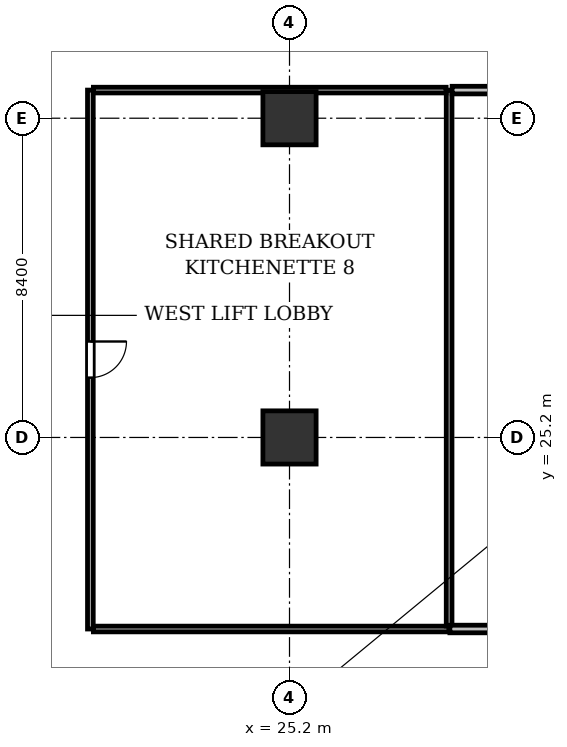
"""IFC4 building model, lengths in metres.
Left out: names, types, materials, properties, quantities, classifications, styles, units other than length and angle.
Written with IfcOpenShell. Run it as: python <this file> out.ifc"""

import sys

from ifc_helpers import new_model, si_unit, direction, frame, frame_2d, origin, origin_2d, place, context, subcontext, project, spatial, rectangle, extrude, element, fill, save


model = new_model("IFC4")
c1 = context("Model", 3, precision=1e-05, world=origin(), true_north=direction((0.0, 1.0)))
c2 = subcontext(c1, "Body", "Model", "MODEL_VIEW")
j1 = project(units=[si_unit("LENGTHUNIT", "METRE"), si_unit("PLANEANGLEUNIT", "RADIAN")], contexts=[c1])
p1 = place(None, origin())
s1 = spatial("IfcSite", under=j1, at=p1, CompositionType="ELEMENT")
p2 = place(p1, origin())
s2 = spatial("IfcBuilding", under=s1, at=p2, CompositionType="ELEMENT")
p3 = place(p2, frame((0.0, 0.0, 15.0)))
s3 = spatial("IfcBuildingStorey", under=s2, at=p3, CompositionType="ELEMENT", Elevation=15.0)
for number, where, z_axis, x_axis in (
    (1, (25.2, 25.2, 0.0), (0.0, 0.0, 1.0), (1.0, 0.0, 0.0)),
    (2, (25.2, 33.6, 0.0), (0.0, 0.0, 1.0), (1.0, 0.0, 0.0)),
):
    element("IfcColumn", number, at=place(p3, frame(where, z_axis=z_axis, x_axis=x_axis)), inside=s3, PredefinedType="COLUMN", context=c2, shape_type="SweptSolid", body=[
        extrude(rectangle(XDim=1.4, YDim=1.4, at=origin_2d()), origin(), (0.0, 0.0, 1.0), 4.8),
    ])
p4 = place(p3, frame((19.96, 34.34, 0.0), z_axis=(0.0, 0.0, 1.0), x_axis=(0.0, -1.0, 0.0)))
e3 = element("IfcWall", 3, at=p4, inside=s3, PredefinedType="PARTITIONING", context=c2, shape_type="SweptSolid", body=[
    extrude(rectangle(XDim=14.18, YDim=0.15, at=frame_2d((7.09, 0.0))), origin(), (0.0, 0.0, 1.0), 3.05),
])
p5 = place(p4, frame((6.615, 0.0, 0.0)))
e4 = element("IfcOpeningElement", 4, at=p5, cuts=e3, PredefinedType="OPENING", context=c2, shape_type="SweptSolid", body=[
    extrude(rectangle(XDim=0.95, YDim=2.15, at=frame_2d((0.475, 1.075))), frame((0.0, 0.085, 0.0), z_axis=(0.0, -1.0, 0.0), x_axis=(1.0, 0.0, 0.0)), (0.0, 0.0, 1.0), 0.17),
])
p6 = place(p3, frame((20.039, 20.16, 0.0), z_axis=(0.0, 0.0, 1.0), x_axis=(1.0, 0.0, 0.0)))
e5 = element("IfcWall", 5, at=p6, inside=s3, PredefinedType="PARTITIONING", context=c2, shape_type="SweptSolid", body=[
    extrude(rectangle(XDim=9.361, YDim=0.15, at=frame_2d((4.68, 0.0))), origin(), (0.0, 0.0, 1.0), 3.25),
])
p7 = place(p3, frame((29.4, 20.239, 0.0), z_axis=(0.0, 0.0, 1.0), x_axis=(0.0, 1.0, 0.0)))
e6 = element("IfcWall", 6, at=p7, inside=s3, PredefinedType="PARTITIONING", context=c2, shape_type="SweptSolid", body=[
    extrude(rectangle(XDim=14.101, YDim=0.15, at=frame_2d((7.051, 0.0))), origin(), (0.0, 0.0, 1.0), 3.05),
])
p8 = place(p3, frame((29.321, 34.34, 0.0), z_axis=(0.0, 0.0, 1.0), x_axis=(-1.0, 0.0, 0.0)))
e7 = element("IfcWall", 7, at=p8, inside=s3, PredefinedType="PARTITIONING", context=c2, shape_type="SweptSolid", body=[
    extrude(rectangle(XDim=9.282, YDim=0.15, at=frame_2d((4.641, 0.0))), origin(), (0.0, 0.0, 1.0), 3.25),
])
p9 = place(p3, frame((52.8, 34.34, 0.0), z_axis=(0.0, 0.0, 1.0), x_axis=(-1.0, 0.0, 0.0)))
e8 = element("IfcWall", 8, at=p9, inside=s3, PredefinedType="PARTITIONING", context=c2, shape_type="SweptSolid", body=[
    extrude(rectangle(XDim=23.321, YDim=0.2, at=frame_2d((11.661, 0.0))), origin(), (0.0, 0.0, 1.0), 3.25),
])
p10 = place(p3, frame((29.42, 20.16, 0.0), z_axis=(0.0, 0.0, 1.0), x_axis=(1.0, 0.0, 0.0)))
e9 = element("IfcWall", 9, at=p10, inside=s3, PredefinedType="PARTITIONING", context=c2, shape_type="SweptSolid", body=[
    extrude(rectangle(XDim=4.976, YDim=0.2, at=frame_2d((2.488, 0.0))), origin(), (0.0, 0.0, 1.0), 3.25),
])
p11 = place(p5, origin())
e10 = element("IfcDoor", 10, at=p11, inside=s3, OperationType="SINGLE_SWING_LEFT", PredefinedType="DOOR", context=c2, shape_type="SweptSolid", body=[
    extrude(rectangle(XDim=0.95, YDim=2.15, at=frame_2d((0.475, 1.075))), frame((0.0, 0.025, 0.0), z_axis=(0.0, -1.0, 0.0), x_axis=(1.0, 0.0, 0.0)), (0.0, 0.0, 1.0), 0.05),
])
fill(e4, e10)
save(model, sys.argv[1])
